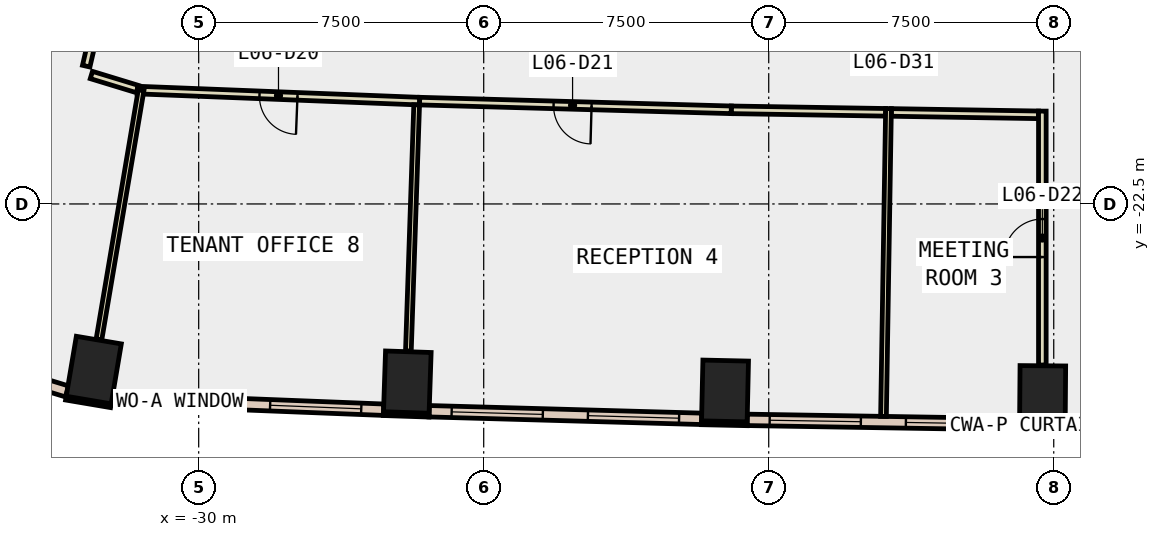
"""IFC4 building model, lengths in metres.
Left out: names, types, materials, properties, quantities, classifications, styles, units other than length and angle.
Written with IfcOpenShell. Run it as: python <this file> out.ifc"""

import sys

from ifc_helpers import new_model, si_unit, direction, frame, frame_2d, origin, origin_2d, place, context, subcontext, project, spatial, rectangle, extrude, element, fill, save


model = new_model("IFC4")
c1 = context("Model", 3, precision=1e-05, world=origin(), true_north=direction((0.0, 1.0)))
c2 = subcontext(c1, "Body", "Model", "MODEL_VIEW")
j1 = project(units=[si_unit("LENGTHUNIT", "METRE"), si_unit("PLANEANGLEUNIT", "RADIAN")], contexts=[c1])
p1 = place(None, origin())
s1 = spatial("IfcSite", under=j1, at=p1, CompositionType="ELEMENT")
p2 = place(p1, origin())
s2 = spatial("IfcBuilding", under=s1, at=p2, CompositionType="ELEMENT")
p3 = place(p2, frame((0.0, 0.0, 35.0)))
s3 = spatial("IfcBuildingStorey", under=s2, at=p3, CompositionType="ELEMENT", Elevation=35.0)
for number, where, z_axis, x_axis in (
    (1, (-32.761, -26.871, -0.6), (0.0, 0.0, 1.0), (-0.986, 0.167, 0.0)),
    (2, (-24.51, -27.188, -0.6), (0.0, 0.0, 1.0), (-0.999, 0.034, 0.0)),
    (3, (-16.15, -27.421, -0.6), (0.0, 0.0, 1.0), (-1.0, 0.022, 0.0)),
    (4, (-7.793, -27.558, -0.6), (0.0, 0.0, 1.0), (-1.0, 0.008, 0.0)),
):
    element("IfcColumn", number, at=place(p3, frame(where, z_axis=z_axis, x_axis=x_axis)), inside=s3, PredefinedType="COLUMN", context=c2, shape_type="SweptSolid", body=[
        extrude(rectangle(XDim=1.2, YDim=1.6, at=origin_2d()), origin(), (0.0, 0.0, 1.0), 4.4),
    ])
for number, where, z_axis, x_axis in (
    (5, (-33.494, -27.609, 0.0), (0.0, 0.0, 1.0), (0.986, -0.167, 0.0)),
    (6, (-25.138, -28.017, 0.0), (0.0, 0.0, 1.0), (0.999, -0.033, 0.0)),
):
    element("IfcWall", number, at=place(p3, frame(where, z_axis=z_axis, x_axis=x_axis)), inside=s3, PredefinedType="STANDARD", context=c2, shape_type="SweptSolid", body=[
        extrude(rectangle(XDim=1.2, YDim=0.1, at=frame_2d((0.6, 0.0))), origin(), (0.0, 0.0, 1.0), 3.8),
    ])
p4 = place(p3, frame((-16.769, -28.258, 0.0), z_axis=(0.0, 0.0, 1.0), x_axis=(0.99976752127, -0.021561618973, 0.0)))
e7 = element("IfcWall", 7, at=p4, inside=s3, PredefinedType="STANDARD", context=c2, shape_type="SweptSolid", body=[
    extrude(rectangle(XDim=1.2, YDim=0.1, at=frame_2d((0.6, 0.0))), origin(), (0.0, 0.0, 1.0), 3.8),
])
p5 = place(p3, frame((-8.4, -28.403, 0.0), z_axis=(0.0, 0.0, 1.0), x_axis=(0.999965208912, -0.008341520563, 0.0)))
e8 = element("IfcWall", 8, at=p5, inside=s3, PredefinedType="STANDARD", context=c2, shape_type="SweptSolid", body=[
    extrude(rectangle(XDim=1.2, YDim=0.1, at=frame_2d((0.6, 0.0))), origin(), (0.0, 0.0, 1.0), 3.8),
])
p6 = place(p3, frame((-32.282, -27.633, 0.0), z_axis=(0.0, 0.0, 1.0), x_axis=(0.999228146648, -0.039282450878, 0.0)))
e9 = element("IfcWall", 9, at=p6, inside=s3, PredefinedType="STANDARD", context=c2, shape_type="SweptSolid", body=[
    extrude(rectangle(XDim=7.154, YDim=0.3, at=frame_2d((3.577, 0.0))), origin(), (0.0, 0.0, 1.0), 3.8),
])
p7 = place(p6, frame((0.588, 0.0, 0.9)))
e10 = element("IfcOpeningElement", 10, at=p7, cuts=e9, PredefinedType="OPENING", context=c2, shape_type="SweptSolid", body=[
    extrude(rectangle(XDim=2.4, YDim=2.6, at=frame_2d((1.2, 1.3))), frame((0.0, 0.16, 0.0), z_axis=(0.0, -1.0, 0.0), x_axis=(1.0, 0.0, 0.0)), (0.0, 0.0, 1.0), 0.32),
])
p8 = place(p6, frame((4.165, 0.0, 0.9)))
e11 = element("IfcOpeningElement", 11, at=p8, cuts=e9, PredefinedType="OPENING", context=c2, shape_type="SweptSolid", body=[
    extrude(rectangle(XDim=2.4, YDim=2.6, at=frame_2d((1.2, 1.3))), frame((0.0, 0.16, 0.0), z_axis=(0.0, -1.0, 0.0), x_axis=(1.0, 0.0, 0.0)), (0.0, 0.0, 1.0), 0.32),
])
p9 = place(p3, frame((-23.936, -27.954, 0.0), z_axis=(0.0, 0.0, 1.0), x_axis=(0.999611502654, -0.02787191709, 0.0)))
e12 = element("IfcWall", 12, at=p9, inside=s3, PredefinedType="STANDARD", context=c2, shape_type="SweptSolid", body=[
    extrude(rectangle(XDim=7.174, YDim=0.3, at=frame_2d((3.587, 0.0))), origin(), (0.0, 0.0, 1.0), 3.8),
])
p10 = place(p9, frame((0.593, 0.0, 0.9)))
e13 = element("IfcOpeningElement", 13, at=p10, cuts=e12, PredefinedType="OPENING", context=c2, shape_type="SweptSolid", body=[
    extrude(rectangle(XDim=2.4, YDim=2.6, at=frame_2d((1.2, 1.3))), frame((0.0, 0.16, 0.0), z_axis=(0.0, -1.0, 0.0), x_axis=(1.0, 0.0, 0.0)), (0.0, 0.0, 1.0), 0.32),
])
p11 = place(p9, frame((4.18, 0.0, 0.9)))
e14 = element("IfcOpeningElement", 14, at=p11, cuts=e12, PredefinedType="OPENING", context=c2, shape_type="SweptSolid", body=[
    extrude(rectangle(XDim=2.4, YDim=2.6, at=frame_2d((1.2, 1.3))), frame((0.0, 0.16, 0.0), z_axis=(0.0, -1.0, 0.0), x_axis=(1.0, 0.0, 0.0)), (0.0, 0.0, 1.0), 0.32),
])
p12 = place(p3, frame((-15.568, -28.181, 0.0), z_axis=(0.0, 0.0, 1.0), x_axis=(0.999866467443, -0.016341581408, 0.0)))
e15 = element("IfcWall", 15, at=p12, inside=s3, PredefinedType="STANDARD", context=c2, shape_type="SweptSolid", body=[
    extrude(rectangle(XDim=7.171, YDim=0.3, at=frame_2d((3.585, 0.0))), origin(), (0.0, 0.0, 1.0), 3.8),
])
p13 = place(p12, frame((0.593, 0.0, 0.9)))
e16 = element("IfcOpeningElement", 16, at=p13, cuts=e15, PredefinedType="OPENING", context=c2, shape_type="SweptSolid", body=[
    extrude(rectangle(XDim=2.4, YDim=2.6, at=frame_2d((1.2, 1.3))), frame((0.0, 0.16, 0.0), z_axis=(0.0, -1.0, 0.0), x_axis=(1.0, 0.0, 0.0)), (0.0, 0.0, 1.0), 0.32),
])
p14 = place(p12, frame((4.178, 0.0, 0.9)))
e17 = element("IfcOpeningElement", 17, at=p14, cuts=e15, PredefinedType="OPENING", context=c2, shape_type="SweptSolid", body=[
    extrude(rectangle(XDim=2.4, YDim=2.6, at=frame_2d((1.2, 1.3))), frame((0.0, 0.16, 0.0), z_axis=(0.0, -1.0, 0.0), x_axis=(1.0, 0.0, 0.0)), (0.0, 0.0, 1.0), 0.32),
])
p15 = place(p3, frame((-36.507, -26.505, 0.0), z_axis=(0.0, 0.0, 1.0), x_axis=(0.95648967224, -0.291766185322, 0.0)))
e18 = element("IfcWall", 18, at=p15, inside=s3, PredefinedType="STANDARD", context=c2, shape_type="SweptSolid", body=[
    extrude(rectangle(XDim=3.181, YDim=0.3, at=frame_2d((1.591, 0.0))), origin(), (0.0, 0.0, 1.0), 3.8),
])
p16 = place(p15, frame((0.891, 0.0, 0.9)))
e19 = element("IfcOpeningElement", 19, at=p16, cuts=e18, PredefinedType="OPENING", context=c2, shape_type="SweptSolid", body=[
    extrude(rectangle(XDim=1.4, YDim=2.6, at=frame_2d((0.7, 1.3))), frame((0.0, 0.16, 0.0), z_axis=(0.0, -1.0, 0.0), x_axis=(1.0, 0.0, 0.0)), (0.0, 0.0, 1.0), 0.32),
])
p17 = place(p3, frame((-31.611, -19.477, 0.0), z_axis=(0.0, 0.0, 1.0), x_axis=(-0.956459113118, 0.291866347723, 0.0)))
e20 = element("IfcWall", 20, at=p17, inside=s3, PredefinedType="PARTITIONING", context=c2, shape_type="SweptSolid", body=[
    extrude(rectangle(XDim=1.268, YDim=0.2, at=frame_2d((0.634, 0.0))), origin(), (0.0, 0.0, 1.0), 3.8),
])
p18 = place(p3, frame((-32.96, -18.874, 0.0), z_axis=(0.0, 0.0, 1.0), x_axis=(0.226081445763, 0.974108402531, 0.0)))
e21 = element("IfcWall", 21, at=p18, inside=s3, PredefinedType="PARTITIONING", context=c2, shape_type="SweptSolid", body=[
    extrude(rectangle(XDim=1.371, YDim=0.2, at=frame_2d((0.686, 0.0))), origin(), (0.0, 0.0, 1.0), 3.8),
])
p19 = place(p3, frame((-24.186, -19.795, 0.0), z_axis=(0.0, 0.0, 1.0), x_axis=(-0.9992284676, 0.039274285953, 0.0)))
e22 = element("IfcWall", 22, at=p19, inside=s3, PredefinedType="PARTITIONING", context=c2, shape_type="SweptSolid", body=[
    extrude(rectangle(XDim=7.435, YDim=0.2, at=frame_2d((3.717, 0.0))), origin(), (0.0, 0.0, 1.0), 3.8),
])
p20 = place(p19, frame((3.217, 0.0, 0.0)))
e23 = element("IfcOpeningElement", 23, at=p20, cuts=e22, PredefinedType="OPENING", context=c2, shape_type="SweptSolid", body=[
    extrude(rectangle(XDim=1.0, YDim=2.1, at=frame_2d((0.5, 1.05))), frame((0.0, 0.11, 0.0), z_axis=(0.0, -1.0, 0.0), x_axis=(1.0, 0.0, 0.0)), (0.0, 0.0, 1.0), 0.22),
])
p21 = place(p3, frame((-11.924, -20.089, 0.0), z_axis=(0.0, 0.0, 1.0), x_axis=(-0.999867376665, 0.016285855216, 0.0)))
e24 = element("IfcWall", 24, at=p21, inside=s3, PredefinedType="PARTITIONING", context=c2, shape_type="SweptSolid", body=[
    extrude(rectangle(XDim=4.062, YDim=0.2, at=frame_2d((2.031, 0.0))), origin(), (0.0, 0.0, 1.0), 3.8),
])
p22 = place(p3, frame((-15.986, -20.023, 0.0), z_axis=(0.0, 0.0, 1.0), x_axis=(-0.999610256124, 0.027916587377, 0.0)))
e25 = element("IfcWall", 25, at=p22, inside=s3, PredefinedType="PARTITIONING", context=c2, shape_type="SweptSolid", body=[
    extrude(rectangle(XDim=8.203, YDim=0.2, at=frame_2d((4.102, 0.0))), origin(), (0.0, 0.0, 1.0), 3.8),
])
p23 = place(p22, frame((3.677, 0.0, 0.0)))
e26 = element("IfcOpeningElement", 26, at=p23, cuts=e25, PredefinedType="OPENING", context=c2, shape_type="SweptSolid", body=[
    extrude(rectangle(XDim=1.0, YDim=2.1, at=frame_2d((0.5, 1.05))), frame((0.0, 0.11, 0.0), z_axis=(0.0, -1.0, 0.0), x_axis=(1.0, 0.0, 0.0)), (0.0, 0.0, 1.0), 0.22),
])
p24 = place(p3, frame((-7.9, -20.155, 0.0), z_axis=(0.0, 0.0, 1.0), x_axis=(-0.999867846419, 0.016256989184, 0.0)))
e27 = element("IfcWall", 27, at=p24, inside=s3, PredefinedType="PARTITIONING", context=c2, shape_type="SweptSolid", body=[
    extrude(rectangle(XDim=3.875, YDim=0.2, at=frame_2d((1.937, 0.0))), origin(), (0.0, 0.0, 1.0), 3.8),
])
p25 = place(p3, frame((-7.8, -26.738, 0.0), z_axis=(0.0, 0.0, 1.0), x_axis=(0.0, 1.0, 0.0)))
e28 = element("IfcWall", 28, at=p25, inside=s3, PredefinedType="PARTITIONING", context=c2, shape_type="SweptSolid", body=[
    extrude(rectangle(XDim=6.681, YDim=0.2, at=frame_2d((3.341, 0.0))), origin(), (0.0, 0.0, 1.0), 3.8),
])
p26 = place(p25, frame((2.841, 0.0, 0.0)))
e29 = element("IfcOpeningElement", 29, at=p26, cuts=e28, PredefinedType="OPENING", context=c2, shape_type="SweptSolid", body=[
    extrude(rectangle(XDim=1.0, YDim=2.1, at=frame_2d((0.5, 1.05))), frame((0.0, 0.11, 0.0), z_axis=(0.0, -1.0, 0.0), x_axis=(1.0, 0.0, 0.0)), (0.0, 0.0, 1.0), 0.22),
])
p27 = place(p3, frame((-31.515, -19.506, 0.0), z_axis=(0.0, 0.0, 1.0), x_axis=(-0.166785823947, -0.985993148521, 0.0)))
e30 = element("IfcWall", 30, at=p27, inside=s3, PredefinedType="PARTITIONING", context=c2, shape_type="SweptSolid", body=[
    extrude(rectangle(XDim=6.65, YDim=0.15, at=frame_2d((3.325, 0.0))), origin(), (0.0, 0.0, 1.0), 3.8),
])
p28 = place(p3, frame((-24.264, -19.892, 0.0), z_axis=(0.0, 0.0, 1.0), x_axis=(-0.033647289587, -0.999433769643, 0.0)))
e31 = element("IfcWall", 31, at=p28, inside=s3, PredefinedType="PARTITIONING", context=c2, shape_type="SweptSolid", body=[
    extrude(rectangle(XDim=6.479, YDim=0.15, at=frame_2d((3.24, 0.0))), origin(), (0.0, 0.0, 1.0), 3.8),
])
p29 = place(p3, frame((-11.848, -19.991, 0.0), z_axis=(0.0, 0.0, 1.0), x_axis=(-0.016305783899, -0.999867051868, 0.0)))
e32 = element("IfcWall", 32, at=p29, inside=s3, PredefinedType="PARTITIONING", context=c2, shape_type="SweptSolid", body=[
    extrude(rectangle(XDim=8.1, YDim=0.15, at=frame_2d((4.05, 0.0))), origin(), (0.0, 0.0, 1.0), 3.8),
])
p30 = place(p7, origin())
e33 = element("IfcWindow", 33, at=p30, inside=s3, PartitioningType="SINGLE_PANEL", PredefinedType="WINDOW", context=c2, shape_type="SweptSolid", body=[
    extrude(rectangle(XDim=2.4, YDim=2.6, at=frame_2d((1.2, 1.3))), frame((0.0, 0.03, 0.0), z_axis=(0.0, -1.0, 0.0), x_axis=(1.0, 0.0, 0.0)), (0.0, 0.0, 1.0), 0.06),
])
fill(e10, e33)
p31 = place(p8, origin())
e34 = element("IfcWindow", 34, at=p31, inside=s3, PartitioningType="SINGLE_PANEL", PredefinedType="WINDOW", context=c2, shape_type="SweptSolid", body=[
    extrude(rectangle(XDim=2.4, YDim=2.6, at=frame_2d((1.2, 1.3))), frame((0.0, 0.03, 0.0), z_axis=(0.0, -1.0, 0.0), x_axis=(1.0, 0.0, 0.0)), (0.0, 0.0, 1.0), 0.06),
])
fill(e11, e34)
p32 = place(p10, origin())
e35 = element("IfcWindow", 35, at=p32, inside=s3, PartitioningType="SINGLE_PANEL", PredefinedType="WINDOW", context=c2, shape_type="SweptSolid", body=[
    extrude(rectangle(XDim=2.4, YDim=2.6, at=frame_2d((1.2, 1.3))), frame((0.0, 0.03, 0.0), z_axis=(0.0, -1.0, 0.0), x_axis=(1.0, 0.0, 0.0)), (0.0, 0.0, 1.0), 0.06),
])
fill(e13, e35)
p33 = place(p11, origin())
e36 = element("IfcWindow", 36, at=p33, inside=s3, PartitioningType="SINGLE_PANEL", PredefinedType="WINDOW", context=c2, shape_type="SweptSolid", body=[
    extrude(rectangle(XDim=2.4, YDim=2.6, at=frame_2d((1.2, 1.3))), frame((0.0, 0.03, 0.0), z_axis=(0.0, -1.0, 0.0), x_axis=(1.0, 0.0, 0.0)), (0.0, 0.0, 1.0), 0.06),
])
fill(e14, e36)
p34 = place(p13, origin())
e37 = element("IfcWindow", 37, at=p34, inside=s3, PartitioningType="SINGLE_PANEL", PredefinedType="WINDOW", context=c2, shape_type="SweptSolid", body=[
    extrude(rectangle(XDim=2.4, YDim=2.6, at=frame_2d((1.2, 1.3))), frame((0.0, 0.03, 0.0), z_axis=(0.0, -1.0, 0.0), x_axis=(1.0, 0.0, 0.0)), (0.0, 0.0, 1.0), 0.06),
])
fill(e16, e37)
p35 = place(p14, origin())
e38 = element("IfcWindow", 38, at=p35, inside=s3, PartitioningType="SINGLE_PANEL", PredefinedType="WINDOW", context=c2, shape_type="SweptSolid", body=[
    extrude(rectangle(XDim=2.4, YDim=2.6, at=frame_2d((1.2, 1.3))), frame((0.0, 0.03, 0.0), z_axis=(0.0, -1.0, 0.0), x_axis=(1.0, 0.0, 0.0)), (0.0, 0.0, 1.0), 0.06),
])
fill(e17, e38)
p36 = place(p20, origin())
e39 = element("IfcDoor", 39, at=p36, inside=s3, OperationType="SINGLE_SWING_LEFT", PredefinedType="DOOR", context=c2, shape_type="SweptSolid", body=[
    extrude(rectangle(XDim=1.0, YDim=2.1, at=frame_2d((0.5, 1.05))), frame((0.0, 0.025, 0.0), z_axis=(0.0, -1.0, 0.0), x_axis=(1.0, 0.0, 0.0)), (0.0, 0.0, 1.0), 0.05),
])
fill(e23, e39)
p37 = place(p23, origin())
e40 = element("IfcDoor", 40, at=p37, inside=s3, OperationType="SINGLE_SWING_RIGHT", PredefinedType="DOOR", context=c2, shape_type="SweptSolid", body=[
    extrude(rectangle(XDim=1.0, YDim=2.1, at=frame_2d((0.5, 1.05))), frame((0.0, 0.025, 0.0), z_axis=(0.0, -1.0, 0.0), x_axis=(1.0, 0.0, 0.0)), (0.0, 0.0, 1.0), 0.05),
])
fill(e26, e40)
p38 = place(p26, origin())
e41 = element("IfcDoor", 41, at=p38, inside=s3, OperationType="SINGLE_SWING_LEFT", PredefinedType="DOOR", context=c2, shape_type="SweptSolid", body=[
    extrude(rectangle(XDim=1.0, YDim=2.1, at=frame_2d((0.5, 1.05))), frame((0.0, 0.025, 0.0), z_axis=(0.0, -1.0, 0.0), x_axis=(1.0, 0.0, 0.0)), (0.0, 0.0, 1.0), 0.05),
])
fill(e29, e41)
save(model, sys.argv[1])
